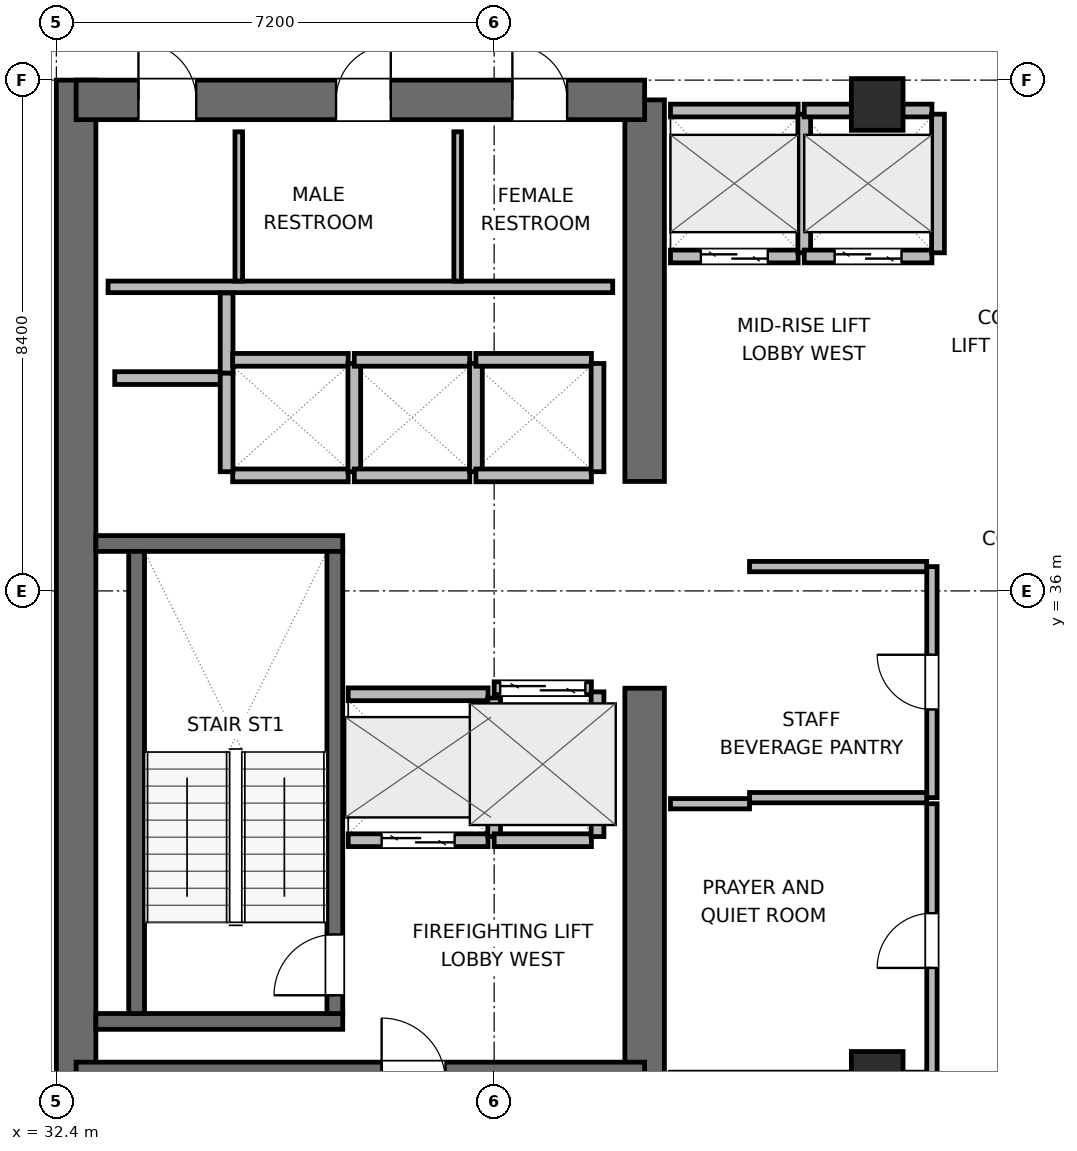
"""IFC4 building model, lengths in metres.
Left out: names, types, materials, properties, quantities, classifications, styles, units other than length and angle.
Written with IfcOpenShell. Run it as: python <this file> out.ifc"""

import sys

from ifc_helpers import new_model, si_unit, direction, frame, frame_2d, origin, origin_2d, place, context, subcontext, project, spatial, rectangle, extrude, element, fill, save


model = new_model("IFC4")
c1 = context("Model", 3, precision=1e-05, world=origin(), true_north=direction((0.0, 1.0)))
c2 = subcontext(c1, "Body", "Model", "MODEL_VIEW")
j1 = project(units=[si_unit("LENGTHUNIT", "METRE"), si_unit("PLANEANGLEUNIT", "RADIAN")], contexts=[c1])
p1 = place(None, origin())
s1 = spatial("IfcSite", under=j1, at=p1, CompositionType="ELEMENT")
p2 = place(p1, origin())
s2 = spatial("IfcBuilding", under=s1, at=p2, CompositionType="ELEMENT")
p3 = place(p2, frame((0.0, 0.0, 201.9)))
s3 = spatial("IfcBuildingStorey", under=s2, at=p3, CompositionType="ELEMENT", Elevation=201.9)
p4 = place(p3, frame((32.725, 27.6, 0.0), z_axis=(0.0, 0.0, 1.0), x_axis=(0.0, 1.0, 0.0)))
e1 = element("IfcWall", 1, at=p4, inside=s3, PredefinedType="SHEAR", context=c2, shape_type="SweptSolid", body=[
    extrude(rectangle(XDim=16.8, YDim=0.65, at=frame_2d((8.4, 0.0))), origin(), (0.0, 0.0, 1.0), 3.9),
])
p5 = place(p3, frame((42.075, 27.925, 0.0), z_axis=(0.0, 0.0, 1.0), x_axis=(0.0, 1.0, 0.0)))
e2 = element("IfcWall", 2, at=p5, inside=s3, PredefinedType="SHEAR", context=c2, shape_type="SweptSolid", body=[
    extrude(rectangle(XDim=6.475, YDim=0.65, at=frame_2d((3.237, 0.0))), origin(), (0.0, 0.0, 1.0), 3.9),
])
p6 = place(p3, frame((42.075, 37.8, 0.0), z_axis=(0.0, 0.0, 1.0), x_axis=(0.0, 1.0, 0.0)))
e3 = element("IfcWall", 3, at=p6, inside=s3, PredefinedType="SHEAR", context=c2, shape_type="SweptSolid", body=[
    extrude(rectangle(XDim=6.275, YDim=0.65, at=frame_2d((3.137, 0.0))), origin(), (0.0, 0.0, 1.0), 3.9),
])
p7 = place(p3, frame((32.725, 27.925, 0.0), z_axis=(0.0, 0.0, 1.0), x_axis=(1.0, 0.0, 0.0)))
e4 = element("IfcWall", 4, at=p7, inside=s3, PredefinedType="SHEAR", context=c2, shape_type="SweptSolid", body=[
    extrude(rectangle(XDim=9.35, YDim=0.65, at=frame_2d((4.675, 0.0))), origin(), (0.0, 0.0, 1.0), 3.9),
])
p8 = place(p7, frame((5.025, 0.0, 0.0)))
e5 = element("IfcOpeningElement", 5, at=p8, cuts=e4, PredefinedType="OPENING", context=c2, shape_type="SweptSolid", body=[
    extrude(rectangle(XDim=1.05, YDim=2.04, at=frame_2d((0.525, 1.02))), frame((0.0, 0.335, 0.0), z_axis=(0.0, -1.0, 0.0), x_axis=(1.0, 0.0, 0.0)), (0.0, 0.0, 1.0), 0.67),
])
p9 = place(p3, frame((32.725, 44.075, 0.0), z_axis=(0.0, 0.0, 1.0), x_axis=(1.0, 0.0, 0.0)))
e6 = element("IfcWall", 6, at=p9, inside=s3, PredefinedType="SHEAR", context=c2, shape_type="SweptSolid", body=[
    extrude(rectangle(XDim=9.35, YDim=0.65, at=frame_2d((4.675, 0.0))), origin(), (0.0, 0.0, 1.0), 3.9),
])
p10 = place(p9, frame((1.025, 0.0, 0.0)))
e7 = element("IfcOpeningElement", 7, at=p10, cuts=e6, PredefinedType="OPENING", context=c2, shape_type="SweptSolid", body=[
    extrude(rectangle(XDim=0.95, YDim=2.04, at=frame_2d((0.475, 1.02))), frame((0.0, 0.335, 0.0), z_axis=(0.0, -1.0, 0.0), x_axis=(1.0, 0.0, 0.0)), (0.0, 0.0, 1.0), 0.67),
])
p11 = place(p9, frame((4.275, 0.0, 0.0)))
e8 = element("IfcOpeningElement", 8, at=p11, cuts=e6, PredefinedType="OPENING", context=c2, shape_type="SweptSolid", body=[
    extrude(rectangle(XDim=0.9, YDim=2.02, at=frame_2d((0.45, 1.01))), frame((0.0, 0.335, 0.0), z_axis=(0.0, -1.0, 0.0), x_axis=(1.0, 0.0, 0.0)), (0.0, 0.0, 1.0), 0.67),
])
p12 = place(p9, frame((7.175, 0.0, 0.0)))
e9 = element("IfcOpeningElement", 9, at=p12, cuts=e6, PredefinedType="OPENING", context=c2, shape_type="SweptSolid", body=[
    extrude(rectangle(XDim=0.9, YDim=2.02, at=frame_2d((0.45, 1.01))), frame((0.0, 0.335, 0.0), z_axis=(0.0, -1.0, 0.0), x_axis=(1.0, 0.0, 0.0)), (0.0, 0.0, 1.0), 0.67),
])
for number, where, z_axis, x_axis in (
    (10, (33.05, 28.92, 0.0), (0.0, 0.0, 1.0), (1.0, 0.0, 0.0)),
    (11, (33.05, 36.78, 0.0), (0.0, 0.0, 1.0), (1.0, 0.0, 0.0)),
):
    element("IfcWall", number, at=place(p3, frame(where, z_axis=z_axis, x_axis=x_axis)), inside=s3, PredefinedType="SHEAR", context=c2, shape_type="SweptSolid", body=[
        extrude(rectangle(XDim=4.06, YDim=0.26, at=frame_2d((2.03, 0.0))), origin(), (0.0, 0.0, 1.0), 3.9),
    ])
p13 = place(p3, frame((33.72, 29.05, 0.0), z_axis=(0.0, 0.0, 1.0), x_axis=(0.0, 1.0, 0.0)))
e12 = element("IfcWall", 12, at=p13, inside=s3, PredefinedType="SHEAR", context=c2, shape_type="SweptSolid", body=[
    extrude(rectangle(XDim=7.6, YDim=0.26, at=frame_2d((3.8, 0.0))), origin(), (0.0, 0.0, 1.0), 3.9),
])
p14 = place(p3, frame((36.98, 29.05, 0.0), z_axis=(0.0, 0.0, 1.0), x_axis=(0.0, 1.0, 0.0)))
e13 = element("IfcWall", 13, at=p14, inside=s3, PredefinedType="SHEAR", context=c2, shape_type="SweptSolid", body=[
    extrude(rectangle(XDim=7.6, YDim=0.26, at=frame_2d((3.8, 0.0))), origin(), (0.0, 0.0, 1.0), 3.9),
])
p15 = place(p14, frame((0.3, 0.0, 0.0)))
e14 = element("IfcOpeningElement", 14, at=p15, cuts=e13, PredefinedType="OPENING", context=c2, shape_type="SweptSolid", body=[
    extrude(rectangle(XDim=1.0, YDim=2.04, at=frame_2d((0.5, 1.02))), frame((0.0, 0.14, 0.0), z_axis=(0.0, -1.0, 0.0), x_axis=(1.0, 0.0, 0.0)), (0.0, 0.0, 1.0), 0.28),
])
for number, where, z_axis, x_axis in (
    (15, (45.9, 28.0, 0.0), (0.0, 0.0, 1.0), (1.0, 0.0, 0.0)),
    (16, (45.9, 44.0, 0.0), (0.0, 0.0, 1.0), (1.0, 0.0, 0.0)),
):
    element("IfcColumn", number, at=place(p3, frame(where, z_axis=z_axis, x_axis=x_axis)), inside=s3, PredefinedType="COLUMN", context=c2, shape_type="SweptSolid", body=[
        extrude(rectangle(XDim=0.85, YDim=0.85, at=origin_2d()), origin(), (0.0, 0.0, 1.0), 3.9),
    ])
p16 = place(p3, frame((33.25, 41.0, 0.0), z_axis=(0.0, 0.0, 1.0), x_axis=(1.0, 0.0, 0.0)))
e17 = element("IfcWall", 17, at=p16, inside=s3, PredefinedType="PLUMBINGWALL", context=c2, shape_type="SweptSolid", body=[
    extrude(rectangle(XDim=8.3, YDim=0.19, at=frame_2d((4.15, 0.0))), origin(), (0.0, 0.0, 1.0), 3.68),
])
for number, where, z_axis, x_axis in (
    (18, (35.4, 41.095, 0.0), (0.0, 0.0, 1.0), (0.0, 1.0, 0.0)),
    (19, (39.0, 41.095, 0.0), (0.0, 0.0, 1.0), (0.0, 1.0, 0.0)),
):
    element("IfcWall", number, at=place(p3, frame(where, z_axis=z_axis, x_axis=x_axis)), inside=s3, PredefinedType="PARTITIONING", context=c2, shape_type="SweptSolid", body=[
        extrude(rectangle(XDim=2.455, YDim=0.125, at=frame_2d((1.228, 0.0))), origin(), (0.0, 0.0, 1.0), 3.68),
    ])
p17 = place(p3, frame((33.36, 39.5, 0.0), z_axis=(0.0, 0.0, 1.0), x_axis=(1.0, 0.0, 0.0)))
e20 = element("IfcWall", 20, at=p17, inside=s3, PredefinedType="PARTITIONING", context=c2, shape_type="SweptSolid", body=[
    extrude(rectangle(XDim=1.86, YDim=0.21, at=frame_2d((0.93, 0.0))), origin(), (0.0, 0.0, 1.0), 3.68),
])
p18 = place(p3, frame((35.2, 39.58, 0.0), z_axis=(0.0, 0.0, 1.0), x_axis=(0.0, 1.0, 0.0)))
e21 = element("IfcWall", 21, at=p18, inside=s3, PredefinedType="PARTITIONING", context=c2, shape_type="SweptSolid", body=[
    extrude(rectangle(XDim=1.32, YDim=0.21, at=frame_2d((0.66, 0.0))), origin(), (0.0, 0.0, 1.0), 3.68),
])
p19 = place(p3, frame((37.2, 31.9, 0.0), z_axis=(0.0, 0.0, 1.0), x_axis=(1.0, 0.0, 0.0)))
e22 = element("IfcWall", 22, at=p19, inside=s3, PredefinedType="PARTITIONING", context=c2, shape_type="SweptSolid", body=[
    extrude(rectangle(XDim=2.3, YDim=0.21, at=frame_2d((1.15, 0.0))), origin(), (0.0, 0.0, 1.0), 3.68),
])
p20 = place(p19, frame((0.55, 0.0, 0.0)))
e23 = element("IfcOpeningElement", 23, at=p20, cuts=e22, PredefinedType="OPENING", context=c2, shape_type="SweptSolid", body=[
    extrude(rectangle(XDim=1.2, YDim=2.04, at=frame_2d((0.6, 1.02))), frame((0.0, 0.115, 0.0), z_axis=(0.0, -1.0, 0.0), x_axis=(1.0, 0.0, 0.0)), (0.0, 0.0, 1.0), 0.23),
])
p21 = place(p3, frame((37.2, 34.3, 0.0), z_axis=(0.0, 0.0, 1.0), x_axis=(1.0, 0.0, 0.0)))
e24 = element("IfcWall", 24, at=p21, inside=s3, PredefinedType="PARTITIONING", context=c2, shape_type="SweptSolid", body=[
    extrude(rectangle(XDim=2.3, YDim=0.21, at=frame_2d((1.15, 0.0))), origin(), (0.0, 0.0, 1.0), 3.68),
])
p22 = place(p3, frame((39.6, 31.96, 0.0), z_axis=(0.0, 0.0, 1.0), x_axis=(0.0, 1.0, 0.0)))
e25 = element("IfcWall", 25, at=p22, inside=s3, PredefinedType="PARTITIONING", context=c2, shape_type="SweptSolid", body=[
    extrude(rectangle(XDim=2.28, YDim=0.21, at=frame_2d((1.14, 0.0))), origin(), (0.0, 0.0, 1.0), 3.68),
])
p23 = place(p3, frame((39.6, 34.4, 0.0), z_axis=(0.0, 0.0, 1.0), x_axis=(1.0, 0.0, 0.0)))
e26 = element("IfcWall", 26, at=p23, inside=s3, PredefinedType="PARTITIONING", context=c2, shape_type="SweptSolid", body=[
    extrude(rectangle(XDim=1.6, YDim=0.21, at=frame_2d((0.8, 0.0))), origin(), (0.0, 0.0, 1.0), 3.68),
])
p24 = place(p23, frame((0.1, 0.0, 0.0)))
e27 = element("IfcOpeningElement", 27, at=p24, cuts=e26, PredefinedType="OPENING", context=c2, shape_type="SweptSolid", body=[
    extrude(rectangle(XDim=1.4, YDim=2.06, at=frame_2d((0.7, 1.03))), frame((0.0, 0.115, 0.0), z_axis=(0.0, -1.0, 0.0), x_axis=(1.0, 0.0, 0.0)), (0.0, 0.0, 1.0), 0.23),
])
p25 = place(p3, frame((39.6, 31.9, 0.0), z_axis=(0.0, 0.0, 1.0), x_axis=(1.0, 0.0, 0.0)))
e28 = element("IfcWall", 28, at=p25, inside=s3, PredefinedType="PARTITIONING", context=c2, shape_type="SweptSolid", body=[
    extrude(rectangle(XDim=1.6, YDim=0.21, at=frame_2d((0.8, 0.0))), origin(), (0.0, 0.0, 1.0), 3.68),
])
p26 = place(p3, frame((41.3, 31.96, 0.0), z_axis=(0.0, 0.0, 1.0), x_axis=(0.0, 1.0, 0.0)))
e29 = element("IfcWall", 29, at=p26, inside=s3, PredefinedType="PARTITIONING", context=c2, shape_type="SweptSolid", body=[
    extrude(rectangle(XDim=2.38, YDim=0.21, at=frame_2d((1.19, 0.0))), origin(), (0.0, 0.0, 1.0), 3.68),
])
p27 = place(p3, frame((42.5, 41.5, 0.0), z_axis=(0.0, 0.0, 1.0), x_axis=(1.0, 0.0, 0.0)))
e30 = element("IfcWall", 30, at=p27, inside=s3, PredefinedType="PARTITIONING", context=c2, shape_type="SweptSolid", body=[
    extrude(rectangle(XDim=2.1, YDim=0.21, at=frame_2d((1.05, 0.0))), origin(), (0.0, 0.0, 1.0), 3.68),
])
p28 = place(p27, frame((0.5, 0.0, 0.0)))
e31 = element("IfcOpeningElement", 31, at=p28, cuts=e30, PredefinedType="OPENING", context=c2, shape_type="SweptSolid", body=[
    extrude(rectangle(XDim=1.1, YDim=2.04, at=frame_2d((0.55, 1.02))), frame((0.0, 0.115, 0.0), z_axis=(0.0, -1.0, 0.0), x_axis=(1.0, 0.0, 0.0)), (0.0, 0.0, 1.0), 0.23),
])
p29 = place(p3, frame((42.5, 43.9, 0.0), z_axis=(0.0, 0.0, 1.0), x_axis=(1.0, 0.0, 0.0)))
e32 = element("IfcWall", 32, at=p29, inside=s3, PredefinedType="PARTITIONING", context=c2, shape_type="SweptSolid", body=[
    extrude(rectangle(XDim=2.1, YDim=0.21, at=frame_2d((1.05, 0.0))), origin(), (0.0, 0.0, 1.0), 2.765),
])
p30 = place(p3, frame((44.7, 41.56, 0.0), z_axis=(0.0, 0.0, 1.0), x_axis=(0.0, 1.0, 0.0)))
e33 = element("IfcWall", 33, at=p30, inside=s3, PredefinedType="PARTITIONING", context=c2, shape_type="SweptSolid", body=[
    extrude(rectangle(XDim=2.28, YDim=0.21, at=frame_2d((1.14, 0.0))), origin(), (0.0, 0.0, 1.0), 3.68),
])
p31 = place(p3, frame((44.7, 41.5, 0.0), z_axis=(0.0, 0.0, 1.0), x_axis=(1.0, 0.0, 0.0)))
e34 = element("IfcWall", 34, at=p31, inside=s3, PredefinedType="PARTITIONING", context=c2, shape_type="SweptSolid", body=[
    extrude(rectangle(XDim=2.1, YDim=0.21, at=frame_2d((1.05, 0.0))), origin(), (0.0, 0.0, 1.0), 3.68),
])
p32 = place(p31, frame((0.5, 0.0, 0.0)))
e35 = element("IfcOpeningElement", 35, at=p32, cuts=e34, PredefinedType="OPENING", context=c2, shape_type="SweptSolid", body=[
    extrude(rectangle(XDim=1.1, YDim=2.04, at=frame_2d((0.55, 1.02))), frame((0.0, 0.115, 0.0), z_axis=(0.0, -1.0, 0.0), x_axis=(1.0, 0.0, 0.0)), (0.0, 0.0, 1.0), 0.23),
])
p33 = place(p3, frame((44.7, 43.9, 0.0), z_axis=(0.0, 0.0, 1.0), x_axis=(1.0, 0.0, 0.0)))
e36 = element("IfcWall", 36, at=p33, inside=s3, PredefinedType="PARTITIONING", context=c2, shape_type="SweptSolid", body=[
    extrude(rectangle(XDim=2.1, YDim=0.21, at=frame_2d((1.05, 0.0))), origin(), (0.0, 0.0, 1.0), 2.765),
])
p34 = place(p3, frame((46.9, 41.56, 0.0), z_axis=(0.0, 0.0, 1.0), x_axis=(0.0, 1.0, 0.0)))
e37 = element("IfcWall", 37, at=p34, inside=s3, PredefinedType="PARTITIONING", context=c2, shape_type="SweptSolid", body=[
    extrude(rectangle(XDim=2.28, YDim=0.21, at=frame_2d((1.14, 0.0))), origin(), (0.0, 0.0, 1.0), 3.68),
])
for number, where, z_axis, x_axis in (
    (38, (35.3, 37.9, 0.0), (0.0, 0.0, 1.0), (1.0, 0.0, 0.0)),
    (39, (35.3, 39.8, 0.0), (0.0, 0.0, 1.0), (1.0, 0.0, 0.0)),
):
    element("IfcWall", number, at=place(p3, frame(where, z_axis=z_axis, x_axis=x_axis)), inside=s3, PredefinedType="PARTITIONING", context=c2, shape_type="SweptSolid", body=[
        extrude(rectangle(XDim=1.9, YDim=0.21, at=frame_2d((0.95, 0.0))), origin(), (0.0, 0.0, 1.0), 3.68),
    ])
p35 = place(p3, frame((35.2, 37.96, 0.0), z_axis=(0.0, 0.0, 1.0), x_axis=(0.0, 1.0, 0.0)))
e40 = element("IfcWall", 40, at=p35, inside=s3, PredefinedType="PARTITIONING", context=c2, shape_type="SweptSolid", body=[
    extrude(rectangle(XDim=1.62, YDim=0.21, at=frame_2d((0.81, 0.0))), origin(), (0.0, 0.0, 1.0), 3.68),
])
p36 = place(p3, frame((37.3, 37.96, 0.0), z_axis=(0.0, 0.0, 1.0), x_axis=(0.0, 1.0, 0.0)))
e41 = element("IfcWall", 41, at=p36, inside=s3, PredefinedType="PARTITIONING", context=c2, shape_type="SweptSolid", body=[
    extrude(rectangle(XDim=1.78, YDim=0.21, at=frame_2d((0.89, 0.0))), origin(), (0.0, 0.0, 1.0), 3.68),
])
for number, where, z_axis, x_axis in (
    (42, (37.3, 37.9, 0.0), (0.0, 0.0, 1.0), (1.0, 0.0, 0.0)),
    (43, (37.3, 39.8, 0.0), (0.0, 0.0, 1.0), (1.0, 0.0, 0.0)),
):
    element("IfcWall", number, at=place(p3, frame(where, z_axis=z_axis, x_axis=x_axis)), inside=s3, PredefinedType="PARTITIONING", context=c2, shape_type="SweptSolid", body=[
        extrude(rectangle(XDim=1.9, YDim=0.21, at=frame_2d((0.95, 0.0))), origin(), (0.0, 0.0, 1.0), 3.68),
    ])
p37 = place(p3, frame((39.3, 37.96, 0.0), z_axis=(0.0, 0.0, 1.0), x_axis=(0.0, 1.0, 0.0)))
e44 = element("IfcWall", 44, at=p37, inside=s3, PredefinedType="PARTITIONING", context=c2, shape_type="SweptSolid", body=[
    extrude(rectangle(XDim=1.78, YDim=0.21, at=frame_2d((0.89, 0.0))), origin(), (0.0, 0.0, 1.0), 3.68),
])
for number, where, z_axis, x_axis in (
    (45, (39.3, 37.9, 0.0), (0.0, 0.0, 1.0), (1.0, 0.0, 0.0)),
    (46, (39.3, 39.8, 0.0), (0.0, 0.0, 1.0), (1.0, 0.0, 0.0)),
):
    element("IfcWall", number, at=place(p3, frame(where, z_axis=z_axis, x_axis=x_axis)), inside=s3, PredefinedType="PARTITIONING", context=c2, shape_type="SweptSolid", body=[
        extrude(rectangle(XDim=1.9, YDim=0.21, at=frame_2d((0.95, 0.0))), origin(), (0.0, 0.0, 1.0), 3.68),
    ])
p38 = place(p3, frame((41.3, 37.96, 0.0), z_axis=(0.0, 0.0, 1.0), x_axis=(0.0, 1.0, 0.0)))
e47 = element("IfcWall", 47, at=p38, inside=s3, PredefinedType="PARTITIONING", context=c2, shape_type="SweptSolid", body=[
    extrude(rectangle(XDim=1.78, YDim=0.21, at=frame_2d((0.89, 0.0))), origin(), (0.0, 0.0, 1.0), 3.68),
])
p39 = place(p3, frame((46.8, 32.6, 0.0), z_axis=(0.0, 0.0, 1.0), x_axis=(0.0, 1.0, 0.0)))
e48 = element("IfcWall", 48, at=p39, inside=s3, PredefinedType="PARTITIONING", context=c2, shape_type="SweptSolid", body=[
    extrude(rectangle(XDim=3.8, YDim=0.17, at=frame_2d((1.9, 0.0))), origin(), (0.0, 0.0, 1.0), 3.68),
])
p40 = place(p39, frame((1.45, 0.0, 0.0)))
e49 = element("IfcOpeningElement", 49, at=p40, cuts=e48, PredefinedType="OPENING", context=c2, shape_type="SweptSolid", body=[
    extrude(rectangle(XDim=0.9, YDim=2.02, at=frame_2d((0.45, 1.01))), frame((0.0, 0.095, 0.0), z_axis=(0.0, -1.0, 0.0), x_axis=(1.0, 0.0, 0.0)), (0.0, 0.0, 1.0), 0.19),
])
for number, where, z_axis, x_axis in (
    (50, (43.8, 32.6, 0.0), (0.0, 0.0, 1.0), (1.0, 0.0, 0.0)),
    (51, (43.8, 36.4, 0.0), (0.0, 0.0, 1.0), (1.0, 0.0, 0.0)),
):
    element("IfcWall", number, at=place(p3, frame(where, z_axis=z_axis, x_axis=x_axis)), inside=s3, PredefinedType="PARTITIONING", context=c2, shape_type="SweptSolid", body=[
        extrude(rectangle(XDim=2.913, YDim=0.17, at=frame_2d((1.457, 0.0))), origin(), (0.0, 0.0, 1.0), 3.68),
    ])
p41 = place(p3, frame((46.8, 28.0, 0.0), z_axis=(0.0, 0.0, 1.0), x_axis=(0.0, 1.0, 0.0)))
e52 = element("IfcWall", 52, at=p41, inside=s3, PredefinedType="PARTITIONING", context=c2, shape_type="SweptSolid", body=[
    extrude(rectangle(XDim=4.5, YDim=0.17, at=frame_2d((2.25, 0.0))), origin(), (0.0, 0.0, 1.0), 3.68),
])
p42 = place(p41, frame((1.8, 0.0, 0.0)))
e53 = element("IfcOpeningElement", 53, at=p42, cuts=e52, PredefinedType="OPENING", context=c2, shape_type="SweptSolid", body=[
    extrude(rectangle(XDim=0.9, YDim=2.02, at=frame_2d((0.45, 1.01))), frame((0.0, 0.095, 0.0), z_axis=(0.0, -1.0, 0.0), x_axis=(1.0, 0.0, 0.0)), (0.0, 0.0, 1.0), 0.19),
])
p43 = place(p3, frame((42.5, 32.5, 0.0), z_axis=(0.0, 0.0, 1.0), x_axis=(1.0, 0.0, 0.0)))
e54 = element("IfcWall", 54, at=p43, inside=s3, PredefinedType="PARTITIONING", context=c2, shape_type="SweptSolid", body=[
    extrude(rectangle(XDim=1.3, YDim=0.17, at=frame_2d((0.65, 0.0))), origin(), (0.0, 0.0, 1.0), 3.68),
])
p44 = place(p15, origin())
e55 = element("IfcDoor", 55, at=p44, inside=s3, OperationType="SINGLE_SWING_LEFT", PredefinedType="DOOR", context=c2, shape_type="SweptSolid", body=[
    extrude(rectangle(XDim=1.0, YDim=2.04, at=frame_2d((0.5, 1.02))), frame((0.0, 0.025, 0.0), z_axis=(0.0, -1.0, 0.0), x_axis=(1.0, 0.0, 0.0)), (0.0, 0.0, 1.0), 0.05),
])
fill(e14, e55)
p45 = place(p20, origin())
e56 = element("IfcDoor", 56, at=p45, inside=s3, OperationType="DOUBLE_DOOR_SLIDING", PredefinedType="DOOR", context=c2, shape_type="SweptSolid", body=[
    extrude(rectangle(XDim=1.2, YDim=2.04, at=frame_2d((0.6, 1.02))), frame((0.0, 0.025, 0.0), z_axis=(0.0, -1.0, 0.0), x_axis=(1.0, 0.0, 0.0)), (0.0, 0.0, 1.0), 0.05),
])
fill(e23, e56)
p46 = place(p24, origin())
e57 = element("IfcDoor", 57, at=p46, inside=s3, OperationType="DOUBLE_DOOR_SLIDING", PredefinedType="DOOR", context=c2, shape_type="SweptSolid", body=[
    extrude(rectangle(XDim=1.4, YDim=2.06, at=frame_2d((0.7, 1.03))), frame((0.0, 0.025, 0.0), z_axis=(0.0, -1.0, 0.0), x_axis=(1.0, 0.0, 0.0)), (0.0, 0.0, 1.0), 0.05),
])
fill(e27, e57)
p47 = place(p28, origin())
e58 = element("IfcDoor", 58, at=p47, inside=s3, OperationType="DOUBLE_DOOR_SLIDING", PredefinedType="DOOR", context=c2, shape_type="SweptSolid", body=[
    extrude(rectangle(XDim=1.1, YDim=2.04, at=frame_2d((0.55, 1.02))), frame((0.0, 0.025, 0.0), z_axis=(0.0, -1.0, 0.0), x_axis=(1.0, 0.0, 0.0)), (0.0, 0.0, 1.0), 0.05),
])
fill(e31, e58)
p48 = place(p32, origin())
e59 = element("IfcDoor", 59, at=p48, inside=s3, OperationType="DOUBLE_DOOR_SLIDING", PredefinedType="DOOR", context=c2, shape_type="SweptSolid", body=[
    extrude(rectangle(XDim=1.1, YDim=2.04, at=frame_2d((0.55, 1.02))), frame((0.0, 0.025, 0.0), z_axis=(0.0, -1.0, 0.0), x_axis=(1.0, 0.0, 0.0)), (0.0, 0.0, 1.0), 0.05),
])
fill(e35, e59)
p49 = place(p10, origin())
e60 = element("IfcDoor", 60, at=p49, inside=s3, OperationType="SINGLE_SWING_LEFT", PredefinedType="DOOR", context=c2, shape_type="SweptSolid", body=[
    extrude(rectangle(XDim=0.95, YDim=2.04, at=frame_2d((0.475, 1.02))), frame((0.0, 0.025, 0.0), z_axis=(0.0, -1.0, 0.0), x_axis=(1.0, 0.0, 0.0)), (0.0, 0.0, 1.0), 0.05),
])
fill(e7, e60)
p50 = place(p11, origin())
e61 = element("IfcDoor", 61, at=p50, inside=s3, OperationType="SINGLE_SWING_RIGHT", PredefinedType="DOOR", context=c2, shape_type="SweptSolid", body=[
    extrude(rectangle(XDim=0.9, YDim=2.02, at=frame_2d((0.45, 1.01))), frame((0.0, 0.025, 0.0), z_axis=(0.0, -1.0, 0.0), x_axis=(1.0, 0.0, 0.0)), (0.0, 0.0, 1.0), 0.05),
])
fill(e8, e61)
p51 = place(p12, origin())
e62 = element("IfcDoor", 62, at=p51, inside=s3, OperationType="SINGLE_SWING_LEFT", PredefinedType="DOOR", context=c2, shape_type="SweptSolid", body=[
    extrude(rectangle(XDim=0.9, YDim=2.02, at=frame_2d((0.45, 1.01))), frame((0.0, 0.025, 0.0), z_axis=(0.0, -1.0, 0.0), x_axis=(1.0, 0.0, 0.0)), (0.0, 0.0, 1.0), 0.05),
])
fill(e9, e62)
p52 = place(p40, origin())
e63 = element("IfcDoor", 63, at=p52, inside=s3, OperationType="SINGLE_SWING_RIGHT", PredefinedType="DOOR", context=c2, shape_type="SweptSolid", body=[
    extrude(rectangle(XDim=0.9, YDim=2.02, at=frame_2d((0.45, 1.01))), frame((0.0, 0.025, 0.0), z_axis=(0.0, -1.0, 0.0), x_axis=(1.0, 0.0, 0.0)), (0.0, 0.0, 1.0), 0.05),
])
fill(e49, e63)
p53 = place(p42, origin())
e64 = element("IfcDoor", 64, at=p53, inside=s3, OperationType="SINGLE_SWING_LEFT", PredefinedType="DOOR", context=c2, shape_type="SweptSolid", body=[
    extrude(rectangle(XDim=0.9, YDim=2.02, at=frame_2d((0.45, 1.01))), frame((0.0, 0.025, 0.0), z_axis=(0.0, -1.0, 0.0), x_axis=(1.0, 0.0, 0.0)), (0.0, 0.0, 1.0), 0.05),
])
fill(e53, e64)
save(model, sys.argv[1])
